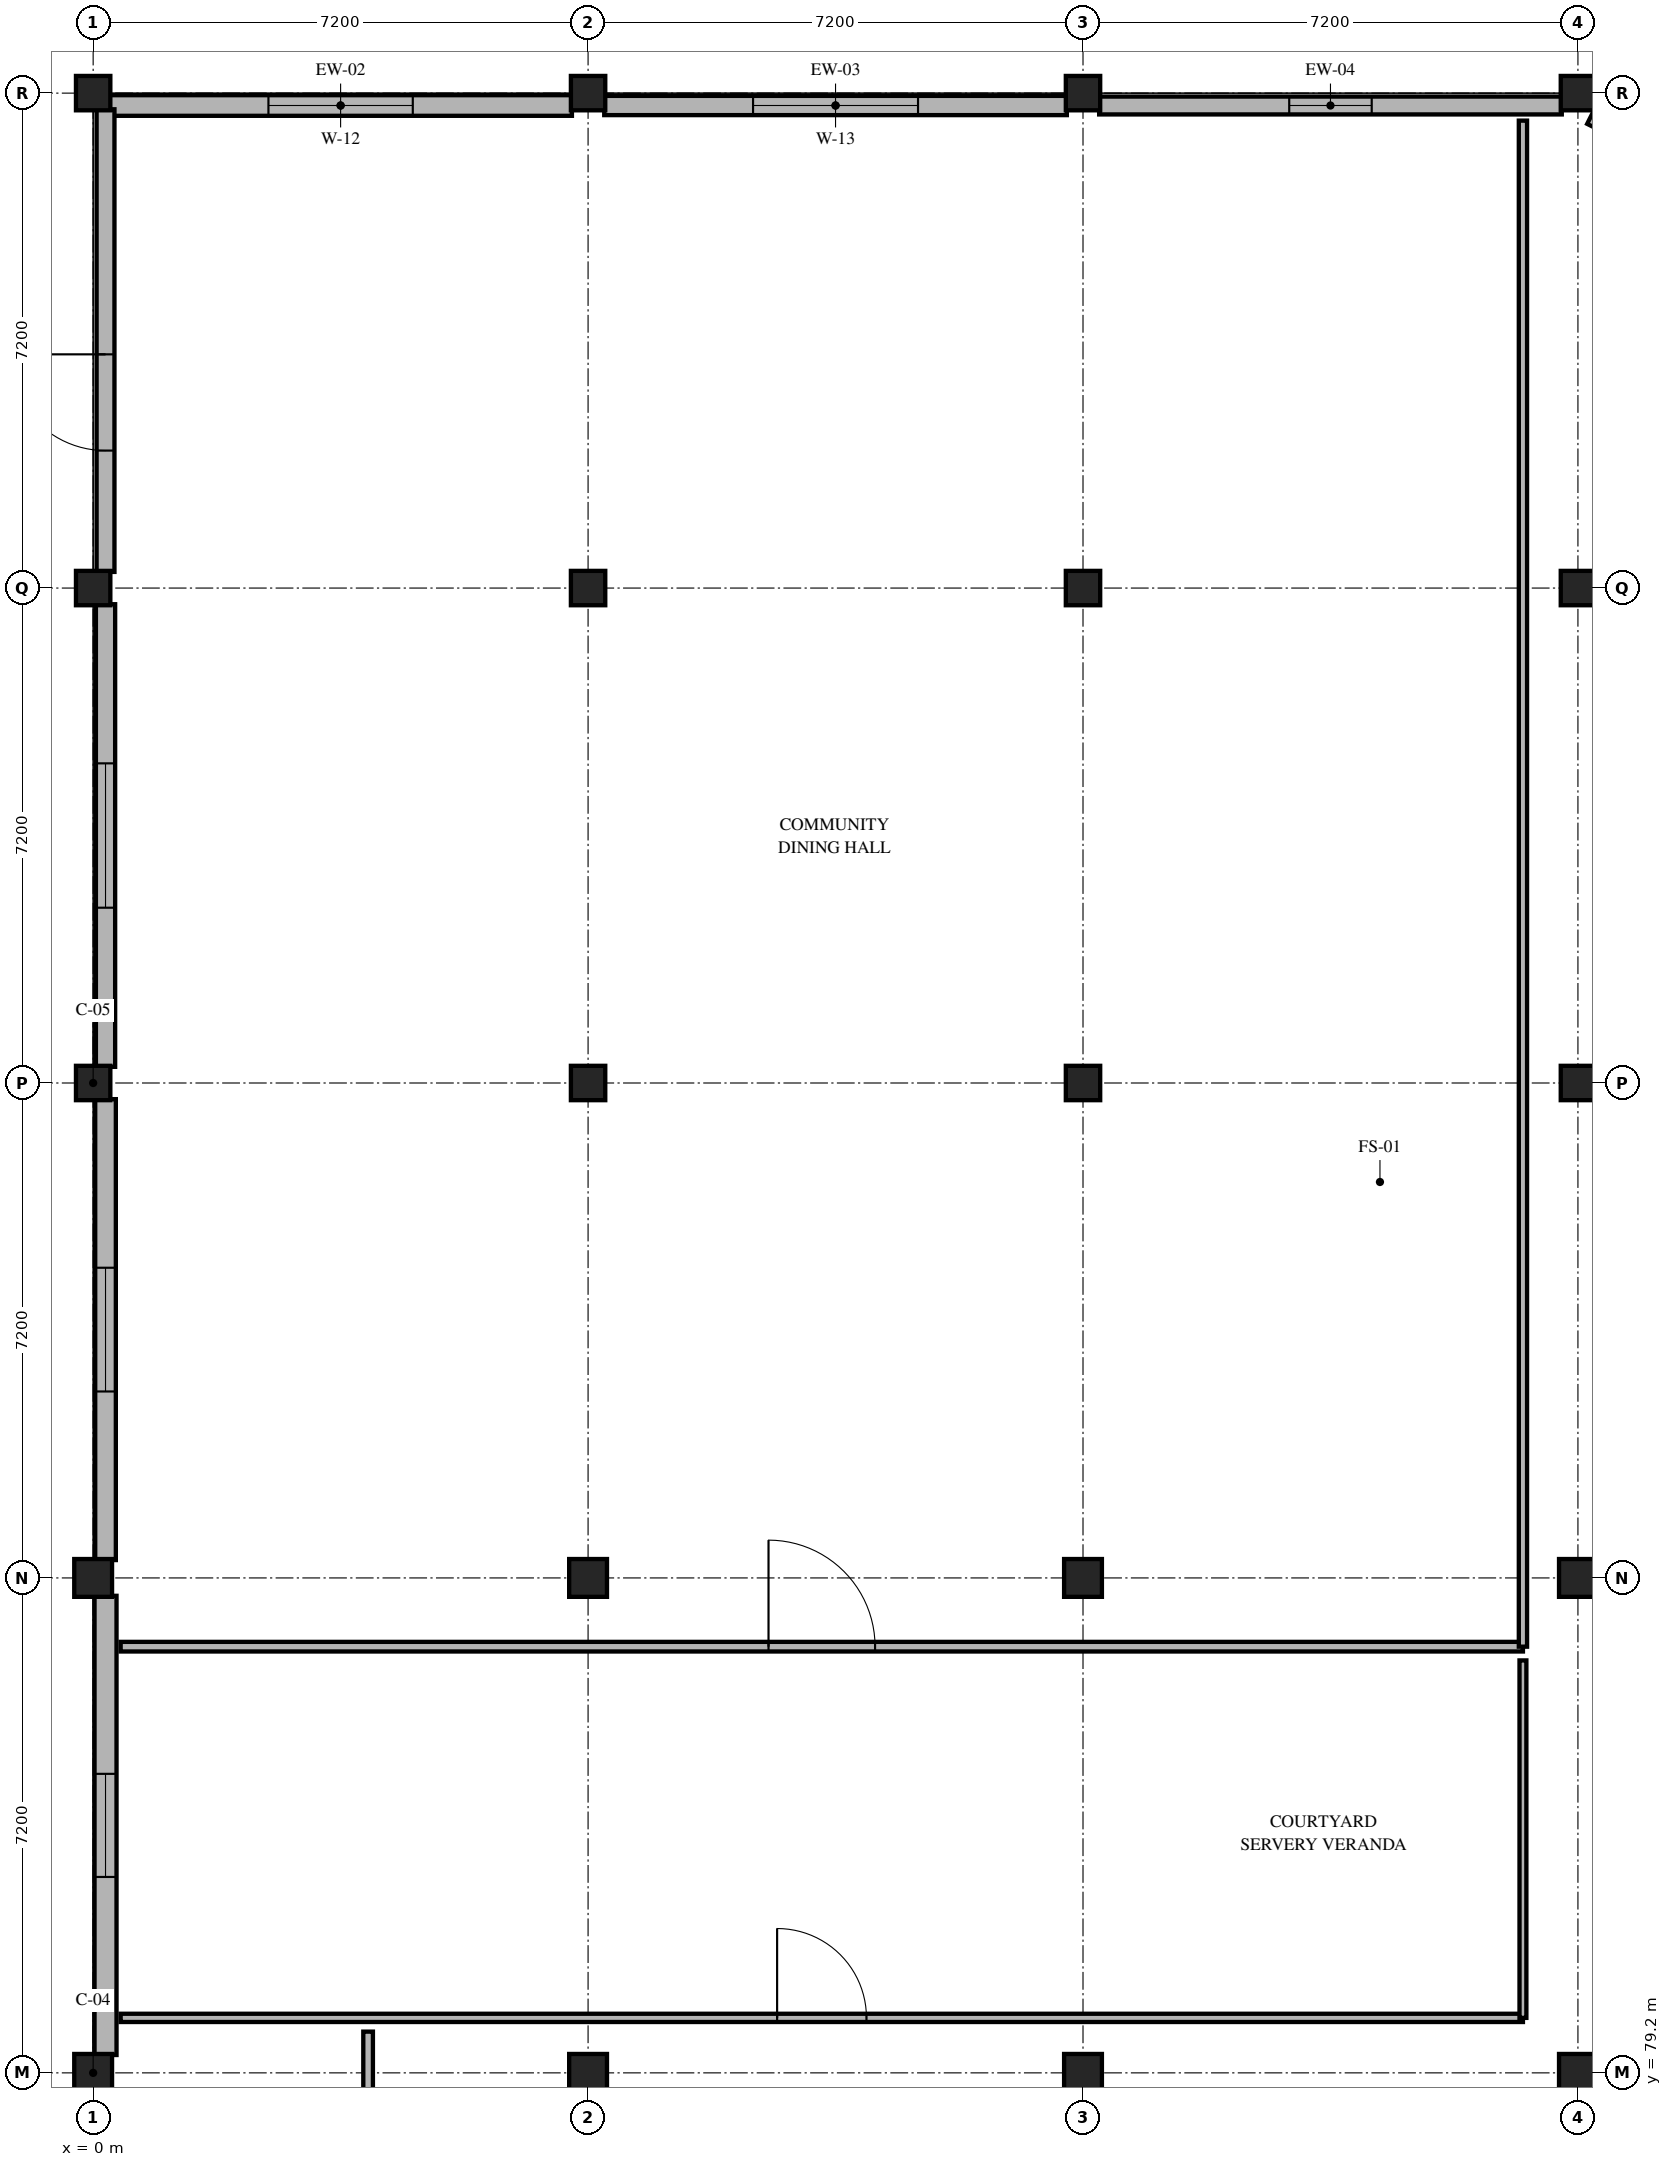
"""IFC4 building model, lengths in metres.
Left out: names, types, materials, properties, quantities, classifications, styles, units other than length and angle.
Written with IfcOpenShell. Run it as: python <this file> out.ifc"""

import sys

from ifc_helpers import new_model, si_unit, direction, frame, frame_2d, origin, origin_2d, place, context, subcontext, project, spatial, rectangle, extrude, element, fill, save


model = new_model("IFC4")
c1 = context("Model", 3, precision=1e-05, world=origin(), true_north=direction((0.0, 1.0)))
c2 = subcontext(c1, "Body", "Model", "MODEL_VIEW")
j1 = project(units=[si_unit("LENGTHUNIT", "METRE"), si_unit("PLANEANGLEUNIT", "RADIAN")], contexts=[c1])
p1 = place(None, origin())
s1 = spatial("IfcSite", under=j1, at=p1, CompositionType="ELEMENT")
p2 = place(p1, origin())
s2 = spatial("IfcBuilding", under=s1, at=p2, CompositionType="ELEMENT")
p3 = place(p2, origin())
s3 = spatial("IfcBuildingStorey", under=s2, at=p3, CompositionType="ELEMENT", Elevation=0.0)
for number, where, z_axis, x_axis in (
    (1, (0.0, 79.2, 0.0), (0.0, 0.0, 1.0), (1.0, 0.0, 0.0)),
    (2, (0.0, 86.4, 0.0), (0.0, 0.0, 1.0), (1.0, 0.0, 0.0)),
):
    element("IfcColumn", number, at=place(p3, frame(where, z_axis=z_axis, x_axis=x_axis)), inside=s3, PredefinedType="COLUMN", context=c2, shape_type="SweptSolid", body=[
        extrude(rectangle(XDim=0.55, YDim=0.55, at=origin_2d()), origin(), (0.0, 0.0, 1.0), 4.5),
    ])
for number, where, z_axis, x_axis in (
    (3, (0.0, 93.6, 0.0), (0.0, 0.0, 1.0), (1.0, 0.0, 0.0)),
    (4, (0.0, 100.8, 0.0), (0.0, 0.0, 1.0), (1.0, 0.0, 0.0)),
):
    element("IfcColumn", number, at=place(p3, frame(where, z_axis=z_axis, x_axis=x_axis)), inside=s3, PredefinedType="COLUMN", context=c2, shape_type="SweptSolid", body=[
        extrude(rectangle(XDim=0.5, YDim=0.5, at=origin_2d()), origin(), (0.0, 0.0, 1.0), 4.5),
    ])
for number, where, z_axis, x_axis in (
    (5, (7.2, 79.2, 0.0), (0.0, 0.0, 1.0), (1.0, 0.0, 0.0)),
    (6, (7.2, 86.4, 0.0), (0.0, 0.0, 1.0), (1.0, 0.0, 0.0)),
):
    element("IfcColumn", number, at=place(p3, frame(where, z_axis=z_axis, x_axis=x_axis)), inside=s3, PredefinedType="COLUMN", context=c2, shape_type="SweptSolid", body=[
        extrude(rectangle(XDim=0.55, YDim=0.55, at=origin_2d()), origin(), (0.0, 0.0, 1.0), 4.5),
    ])
for number, where, z_axis, x_axis in (
    (7, (7.2, 93.6, 0.0), (0.0, 0.0, 1.0), (1.0, 0.0, 0.0)),
    (8, (7.2, 100.8, 0.0), (0.0, 0.0, 1.0), (1.0, 0.0, 0.0)),
):
    element("IfcColumn", number, at=place(p3, frame(where, z_axis=z_axis, x_axis=x_axis)), inside=s3, PredefinedType="COLUMN", context=c2, shape_type="SweptSolid", body=[
        extrude(rectangle(XDim=0.5, YDim=0.5, at=origin_2d()), origin(), (0.0, 0.0, 1.0), 4.5),
    ])
for number, where, z_axis, x_axis in (
    (9, (14.4, 79.2, 0.0), (0.0, 0.0, 1.0), (1.0, 0.0, 0.0)),
    (10, (14.4, 86.4, 0.0), (0.0, 0.0, 1.0), (1.0, 0.0, 0.0)),
):
    element("IfcColumn", number, at=place(p3, frame(where, z_axis=z_axis, x_axis=x_axis)), inside=s3, PredefinedType="COLUMN", context=c2, shape_type="SweptSolid", body=[
        extrude(rectangle(XDim=0.55, YDim=0.55, at=origin_2d()), origin(), (0.0, 0.0, 1.0), 4.5),
    ])
for number, where, z_axis, x_axis in (
    (11, (14.4, 93.6, 0.0), (0.0, 0.0, 1.0), (1.0, 0.0, 0.0)),
    (12, (14.4, 100.8, 0.0), (0.0, 0.0, 1.0), (1.0, 0.0, 0.0)),
):
    element("IfcColumn", number, at=place(p3, frame(where, z_axis=z_axis, x_axis=x_axis)), inside=s3, PredefinedType="COLUMN", context=c2, shape_type="SweptSolid", body=[
        extrude(rectangle(XDim=0.5, YDim=0.5, at=origin_2d()), origin(), (0.0, 0.0, 1.0), 4.5),
    ])
for number, where, z_axis, x_axis in (
    (13, (21.6, 79.2, 0.0), (0.0, 0.0, 1.0), (1.0, 0.0, 0.0)),
    (14, (21.6, 86.4, 0.0), (0.0, 0.0, 1.0), (1.0, 0.0, 0.0)),
):
    element("IfcColumn", number, at=place(p3, frame(where, z_axis=z_axis, x_axis=x_axis)), inside=s3, PredefinedType="COLUMN", context=c2, shape_type="SweptSolid", body=[
        extrude(rectangle(XDim=0.55, YDim=0.55, at=origin_2d()), origin(), (0.0, 0.0, 1.0), 4.5),
    ])
for number, where, z_axis, x_axis in (
    (15, (21.6, 93.6, 0.0), (0.0, 0.0, 1.0), (1.0, 0.0, 0.0)),
    (16, (21.6, 100.8, 0.0), (0.0, 0.0, 1.0), (1.0, 0.0, 0.0)),
    (17, (0.0, 108.0, 0.0), (0.0, 0.0, 1.0), (1.0, 0.0, 0.0)),
    (18, (7.2, 108.0, 0.0), (0.0, 0.0, 1.0), (1.0, 0.0, 0.0)),
    (19, (14.4, 108.0, 0.0), (0.0, 0.0, 1.0), (1.0, 0.0, 0.0)),
    (20, (21.6, 108.0, 0.0), (0.0, 0.0, 1.0), (1.0, 0.0, 0.0)),
):
    element("IfcColumn", number, at=place(p3, frame(where, z_axis=z_axis, x_axis=x_axis)), inside=s3, PredefinedType="COLUMN", context=c2, shape_type="SweptSolid", body=[
        extrude(rectangle(XDim=0.5, YDim=0.5, at=origin_2d()), origin(), (0.0, 0.0, 1.0), 4.5),
    ])
p4 = place(p3, frame((21.806, 107.696, 0.0), z_axis=(0.0, 0.0, 1.0), x_axis=(0.89442087371, -0.447226229857, 0.0)))
e21 = element("IfcWall", 21, at=p4, inside=s3, PredefinedType="SOLIDWALL", context=c2, shape_type="SweptSolid", body=[
    extrude(rectangle(XDim=15.459, YDim=0.32, at=frame_2d((7.729, 0.0))), origin(), (0.0, 0.0, 1.0), 4.24),
])
p5 = place(p4, frame((6.729, 0.0, 0.0)))
e22 = element("IfcOpeningElement", 22, at=p5, cuts=e21, PredefinedType="OPENING", context=c2, shape_type="SweptSolid", body=[
    extrude(rectangle(XDim=2.0, YDim=2.4, at=frame_2d((1.0, 1.2))), frame((0.0, 0.17, 0.0), z_axis=(0.0, -1.0, 0.0), x_axis=(1.0, 0.0, 0.0)), (0.0, 0.0, 1.0), 0.34),
])
p6 = place(p3, frame((0.235, 107.82, 0.0), z_axis=(0.0, 0.0, 1.0), x_axis=(1.0, 0.0, 0.0)))
e23 = element("IfcWall", 23, at=p6, inside=s3, PredefinedType="SOLIDWALL", context=c2, shape_type="SweptSolid", body=[
    extrude(rectangle(XDim=6.73, YDim=0.3, at=frame_2d((3.365, 0.0))), origin(), (0.0, 0.0, 1.0), 4.24),
])
p7 = place(p6, frame((2.315, 0.0, 0.9)))
e24 = element("IfcOpeningElement", 24, at=p7, cuts=e23, PredefinedType="OPENING", context=c2, shape_type="SweptSolid", body=[
    extrude(rectangle(XDim=2.1, YDim=1.35, at=frame_2d((1.05, 0.675))), frame((0.0, 0.16, 0.0), z_axis=(0.0, -1.0, 0.0), x_axis=(1.0, 0.0, 0.0)), (0.0, 0.0, 1.0), 0.32),
])
p8 = place(p3, frame((7.435, 107.82, 0.0), z_axis=(0.0, 0.0, 1.0), x_axis=(1.0, 0.0, 0.0)))
e25 = element("IfcWall", 25, at=p8, inside=s3, PredefinedType="SOLIDWALL", context=c2, shape_type="SweptSolid", body=[
    extrude(rectangle(XDim=6.73, YDim=0.28, at=frame_2d((3.365, 0.0))), origin(), (0.0, 0.0, 1.0), 4.24),
])
p9 = place(p8, frame((2.165, 0.0, 0.9)))
e26 = element("IfcOpeningElement", 26, at=p9, cuts=e25, PredefinedType="OPENING", context=c2, shape_type="SweptSolid", body=[
    extrude(rectangle(XDim=2.4, YDim=1.35, at=frame_2d((1.2, 0.675))), frame((0.0, 0.15, 0.0), z_axis=(0.0, -1.0, 0.0), x_axis=(1.0, 0.0, 0.0)), (0.0, 0.0, 1.0), 0.3),
])
p10 = place(p3, frame((14.635, 107.82, 0.0), z_axis=(0.0, 0.0, 1.0), x_axis=(1.0, 0.0, 0.0)))
e27 = element("IfcWall", 27, at=p10, inside=s3, PredefinedType="SOLIDWALL", context=c2, shape_type="SweptSolid", body=[
    extrude(rectangle(XDim=6.73, YDim=0.26, at=frame_2d((3.365, 0.0))), origin(), (0.0, 0.0, 1.0), 4.24),
])
p11 = place(p10, frame((2.765, 0.0, 0.75)))
e28 = element("IfcOpeningElement", 28, at=p11, cuts=e27, PredefinedType="OPENING", context=c2, shape_type="SweptSolid", body=[
    extrude(rectangle(XDim=1.2, YDim=1.5, at=frame_2d((0.6, 0.75))), frame((0.0, 0.14, 0.0), z_axis=(0.0, -1.0, 0.0), x_axis=(1.0, 0.0, 0.0)), (0.0, 0.0, 1.0), 0.28),
])
p12 = place(p3, frame((0.18, 79.46, 0.0), z_axis=(0.0, 0.0, 1.0), x_axis=(0.0, 1.0, 0.0)))
e29 = element("IfcWall", 29, at=p12, inside=s3, PredefinedType="SOLIDWALL", context=c2, shape_type="SweptSolid", body=[
    extrude(rectangle(XDim=6.68, YDim=0.32, at=frame_2d((3.34, 0.0))), origin(), (0.0, 0.0, 1.0), 3.49),
])
p13 = place(p12, frame((2.59, 0.0, 0.75)))
e30 = element("IfcOpeningElement", 30, at=p13, cuts=e29, PredefinedType="OPENING", context=c2, shape_type="SweptSolid", body=[
    extrude(rectangle(XDim=1.5, YDim=1.5, at=frame_2d((0.75, 0.75))), frame((0.0, 0.17, 0.0), z_axis=(0.0, -1.0, 0.0), x_axis=(1.0, 0.0, 0.0)), (0.0, 0.0, 1.0), 0.34),
])
p14 = place(p3, frame((0.18, 86.66, 0.0), z_axis=(0.0, 0.0, 1.0), x_axis=(0.0, 1.0, 0.0)))
e31 = element("IfcWall", 31, at=p14, inside=s3, PredefinedType="SOLIDWALL", context=c2, shape_type="SweptSolid", body=[
    extrude(rectangle(XDim=6.705, YDim=0.3, at=frame_2d((3.353, 0.0))), origin(), (0.0, 0.0, 1.0), 3.64),
])
p15 = place(p14, frame((2.452, 0.0, 0.75)))
e32 = element("IfcOpeningElement", 32, at=p15, cuts=e31, PredefinedType="OPENING", context=c2, shape_type="SweptSolid", body=[
    extrude(rectangle(XDim=1.8, YDim=1.5, at=frame_2d((0.9, 0.75))), frame((0.0, 0.16, 0.0), z_axis=(0.0, -1.0, 0.0), x_axis=(1.0, 0.0, 0.0)), (0.0, 0.0, 1.0), 0.32),
])
p16 = place(p3, frame((0.18, 93.835, 0.0), z_axis=(0.0, 0.0, 1.0), x_axis=(0.0, 1.0, 0.0)))
e33 = element("IfcWall", 33, at=p16, inside=s3, PredefinedType="SOLIDWALL", context=c2, shape_type="SweptSolid", body=[
    extrude(rectangle(XDim=6.73, YDim=0.28, at=frame_2d((3.365, 0.0))), origin(), (0.0, 0.0, 1.0), 4.24),
])
p17 = place(p16, frame((2.315, 0.0, 0.75)))
e34 = element("IfcOpeningElement", 34, at=p17, cuts=e33, PredefinedType="OPENING", context=c2, shape_type="SweptSolid", body=[
    extrude(rectangle(XDim=2.1, YDim=1.5, at=frame_2d((1.05, 0.75))), frame((0.0, 0.15, 0.0), z_axis=(0.0, -1.0, 0.0), x_axis=(1.0, 0.0, 0.0)), (0.0, 0.0, 1.0), 0.3),
])
p18 = place(p3, frame((0.18, 101.035, 0.0), z_axis=(0.0, 0.0, 1.0), x_axis=(0.0, 1.0, 0.0)))
e35 = element("IfcWall", 35, at=p18, inside=s3, PredefinedType="SOLIDWALL", context=c2, shape_type="SweptSolid", body=[
    extrude(rectangle(XDim=6.73, YDim=0.26, at=frame_2d((3.365, 0.0))), origin(), (0.0, 0.0, 1.0), 4.24),
])
p19 = place(p18, frame((1.765, 0.0, 0.0)))
e36 = element("IfcOpeningElement", 36, at=p19, cuts=e35, PredefinedType="OPENING", context=c2, shape_type="SweptSolid", body=[
    extrude(rectangle(XDim=1.4, YDim=2.2, at=frame_2d((0.7, 1.1))), frame((0.0, 0.14, 0.0), z_axis=(0.0, -1.0, 0.0), x_axis=(1.0, 0.0, 0.0)), (0.0, 0.0, 1.0), 0.28),
])
p20 = place(p3, frame((0.4, 85.4, 0.0), z_axis=(0.0, 0.0, 1.0), x_axis=(1.0, 0.0, 0.0)))
e37 = element("IfcWall", 37, at=p20, inside=s3, PredefinedType="PARTITIONING", context=c2, shape_type="SweptSolid", body=[
    extrude(rectangle(XDim=20.4, YDim=0.14, at=frame_2d((10.2, 0.0))), origin(), (0.0, 0.0, 1.0), 3.44),
])
p21 = place(p20, frame((9.425, 0.0, 0.0)))
e38 = element("IfcOpeningElement", 38, at=p21, cuts=e37, PredefinedType="OPENING", context=c2, shape_type="SweptSolid", body=[
    extrude(rectangle(XDim=1.55, YDim=2.25, at=frame_2d((0.775, 1.125))), frame((0.0, 0.08, 0.0), z_axis=(0.0, -1.0, 0.0), x_axis=(1.0, 0.0, 0.0)), (0.0, 0.0, 1.0), 0.16),
])
p22 = place(p3, frame((20.8, 85.4, 0.0), z_axis=(0.0, 0.0, 1.0), x_axis=(0.0, 1.0, 0.0)))
e39 = element("IfcWall", 39, at=p22, inside=s3, PredefinedType="PARTITIONING", context=c2, shape_type="SweptSolid", body=[
    extrude(rectangle(XDim=22.2, YDim=0.12, at=frame_2d((11.1, 0.0))), origin(), (0.0, 0.0, 1.0), 3.49),
])
p23 = place(p3, frame((0.4, 80.0, 0.0), z_axis=(0.0, 0.0, 1.0), x_axis=(1.0, 0.0, 0.0)))
e40 = element("IfcWall", 40, at=p23, inside=s3, PredefinedType="PARTITIONING", context=c2, shape_type="SweptSolid", body=[
    extrude(rectangle(XDim=20.4, YDim=0.12, at=frame_2d((10.2, 0.0))), origin(), (0.0, 0.0, 1.0), 3.44),
])
p24 = place(p23, frame((9.55, 0.0, 0.0)))
e41 = element("IfcOpeningElement", 41, at=p24, cuts=e40, PredefinedType="OPENING", context=c2, shape_type="SweptSolid", body=[
    extrude(rectangle(XDim=1.3, YDim=2.2, at=frame_2d((0.65, 1.1))), frame((0.0, 0.07, 0.0), z_axis=(0.0, -1.0, 0.0), x_axis=(1.0, 0.0, 0.0)), (0.0, 0.0, 1.0), 0.14),
])
p25 = place(p3, frame((20.8, 80.0, 0.0), z_axis=(0.0, 0.0, 1.0), x_axis=(0.0, 1.0, 0.0)))
e42 = element("IfcWall", 42, at=p25, inside=s3, PredefinedType="PARTITIONING", context=c2, shape_type="SweptSolid", body=[
    extrude(rectangle(XDim=5.2, YDim=0.1, at=frame_2d((2.6, 0.0))), origin(), (0.0, 0.0, 1.0), 3.68),
])
p26 = place(p3, frame((4.0, 72.63, 0.0), z_axis=(0.0, 0.0, 1.0), x_axis=(0.0, 1.0, 0.0)))
e43 = element("IfcWall", 43, at=p26, inside=s3, PredefinedType="PARTITIONING", context=c2, shape_type="SweptSolid", body=[
    extrude(rectangle(XDim=7.17, YDim=0.14, at=frame_2d((3.585, 0.0))), origin(), (0.0, 0.0, 1.0), 3.49),
])
p27 = place(p26, frame((3.145, 0.0, 0.0)))
e44 = element("IfcOpeningElement", 44, at=p27, cuts=e43, PredefinedType="OPENING", context=c2, shape_type="SweptSolid", body=[
    extrude(rectangle(XDim=0.88, YDim=2.1, at=frame_2d((0.44, 1.05))), frame((0.0, 0.08, 0.0), z_axis=(0.0, -1.0, 0.0), x_axis=(1.0, 0.0, 0.0)), (0.0, 0.0, 1.0), 0.16),
])
p28 = place(p7, origin())
e45 = element("IfcWindow", 45, at=p28, inside=s3, PartitioningType="SINGLE_PANEL", PredefinedType="WINDOW", context=c2, shape_type="SweptSolid", body=[
    extrude(rectangle(XDim=2.1, YDim=1.35, at=frame_2d((1.05, 0.675))), frame((0.0, 0.03, 0.0), z_axis=(0.0, -1.0, 0.0), x_axis=(1.0, 0.0, 0.0)), (0.0, 0.0, 1.0), 0.06),
])
fill(e24, e45)
p29 = place(p9, origin())
e46 = element("IfcWindow", 46, at=p29, inside=s3, PartitioningType="SINGLE_PANEL", PredefinedType="WINDOW", context=c2, shape_type="SweptSolid", body=[
    extrude(rectangle(XDim=2.4, YDim=1.35, at=frame_2d((1.2, 0.675))), frame((0.0, 0.03, 0.0), z_axis=(0.0, -1.0, 0.0), x_axis=(1.0, 0.0, 0.0)), (0.0, 0.0, 1.0), 0.06),
])
fill(e26, e46)
p30 = place(p11, origin())
e47 = element("IfcWindow", 47, at=p30, inside=s3, PartitioningType="SINGLE_PANEL", PredefinedType="WINDOW", context=c2, shape_type="SweptSolid", body=[
    extrude(rectangle(XDim=1.2, YDim=1.5, at=frame_2d((0.6, 0.75))), frame((0.0, 0.03, 0.0), z_axis=(0.0, -1.0, 0.0), x_axis=(1.0, 0.0, 0.0)), (0.0, 0.0, 1.0), 0.06),
])
fill(e28, e47)
p31 = place(p13, origin())
e48 = element("IfcWindow", 48, at=p31, inside=s3, PartitioningType="SINGLE_PANEL", PredefinedType="WINDOW", context=c2, shape_type="SweptSolid", body=[
    extrude(rectangle(XDim=1.5, YDim=1.5, at=frame_2d((0.75, 0.75))), frame((0.0, 0.03, 0.0), z_axis=(0.0, -1.0, 0.0), x_axis=(1.0, 0.0, 0.0)), (0.0, 0.0, 1.0), 0.06),
])
fill(e30, e48)
p32 = place(p15, origin())
e49 = element("IfcWindow", 49, at=p32, inside=s3, PartitioningType="SINGLE_PANEL", PredefinedType="WINDOW", context=c2, shape_type="SweptSolid", body=[
    extrude(rectangle(XDim=1.8, YDim=1.5, at=frame_2d((0.9, 0.75))), frame((0.0, 0.03, 0.0), z_axis=(0.0, -1.0, 0.0), x_axis=(1.0, 0.0, 0.0)), (0.0, 0.0, 1.0), 0.06),
])
fill(e32, e49)
p33 = place(p17, origin())
e50 = element("IfcWindow", 50, at=p33, inside=s3, PartitioningType="SINGLE_PANEL", PredefinedType="WINDOW", context=c2, shape_type="SweptSolid", body=[
    extrude(rectangle(XDim=2.1, YDim=1.5, at=frame_2d((1.05, 0.75))), frame((0.0, 0.03, 0.0), z_axis=(0.0, -1.0, 0.0), x_axis=(1.0, 0.0, 0.0)), (0.0, 0.0, 1.0), 0.06),
])
fill(e34, e50)
p34 = place(p19, origin())
e51 = element("IfcDoor", 51, at=p34, inside=s3, OperationType="SINGLE_SWING_RIGHT", PredefinedType="DOOR", context=c2, shape_type="SweptSolid", body=[
    extrude(rectangle(XDim=1.4, YDim=2.2, at=frame_2d((0.7, 1.1))), frame((0.0, 0.025, 0.0), z_axis=(0.0, -1.0, 0.0), x_axis=(1.0, 0.0, 0.0)), (0.0, 0.0, 1.0), 0.05),
])
fill(e36, e51)
p35 = place(p21, origin())
e52 = element("IfcDoor", 52, at=p35, inside=s3, OperationType="SINGLE_SWING_LEFT", PredefinedType="DOOR", context=c2, shape_type="SweptSolid", body=[
    extrude(rectangle(XDim=1.55, YDim=2.25, at=frame_2d((0.775, 1.125))), frame((0.0, 0.025, 0.0), z_axis=(0.0, -1.0, 0.0), x_axis=(1.0, 0.0, 0.0)), (0.0, 0.0, 1.0), 0.05),
])
fill(e38, e52)
p36 = place(p24, origin())
e53 = element("IfcDoor", 53, at=p36, inside=s3, OperationType="SINGLE_SWING_LEFT", PredefinedType="DOOR", context=c2, shape_type="SweptSolid", body=[
    extrude(rectangle(XDim=1.3, YDim=2.2, at=frame_2d((0.65, 1.1))), frame((0.0, 0.025, 0.0), z_axis=(0.0, -1.0, 0.0), x_axis=(1.0, 0.0, 0.0)), (0.0, 0.0, 1.0), 0.05),
])
fill(e41, e53)
save(model, sys.argv[1])
